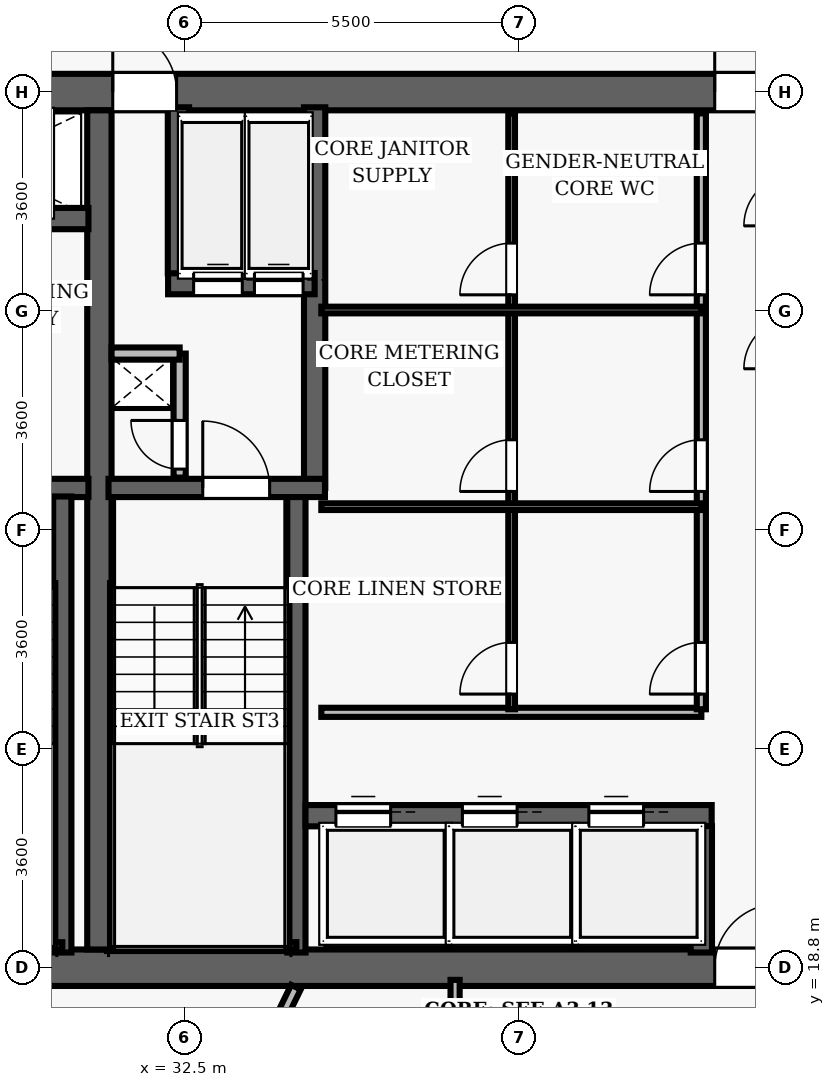
"""IFC4 building model, lengths in metres.
Left out: names, types, materials, properties, quantities, classifications, styles, units other than length and angle.
Written with IfcOpenShell. Run it as: python <this file> out.ifc"""

import sys

from ifc_helpers import new_model, si_unit, direction, frame, frame_2d, origin, place, context, subcontext, project, spatial, rectangle, extrude, element, fill, save


model = new_model("IFC4")
c1 = context("Model", 3, precision=1e-05, world=origin(), true_north=direction((0.0, 1.0)))
c2 = subcontext(c1, "Body", "Model", "MODEL_VIEW")
j1 = project(units=[si_unit("LENGTHUNIT", "METRE"), si_unit("PLANEANGLEUNIT", "RADIAN")], contexts=[c1])
p1 = place(None, origin())
s1 = spatial("IfcSite", under=j1, at=p1, CompositionType="ELEMENT")
p2 = place(p1, origin())
s2 = spatial("IfcBuilding", under=s1, at=p2, CompositionType="ELEMENT")
p3 = place(p2, frame((0.0, 0.0, 151.8)))
s3 = spatial("IfcBuildingStorey", under=s2, at=p3, CompositionType="ELEMENT", Elevation=151.8)
p4 = place(p3, frame((26.7, 18.8, 0.0), z_axis=(0.0, 0.0, 1.0), x_axis=(1.0, 0.0, 0.0)))
e1 = element("IfcWall", 1, at=p4, inside=s3, PredefinedType="SHEAR", context=c2, shape_type="SweptSolid", body=[
    extrude(rectangle(XDim=22.6, YDim=0.6, at=frame_2d((11.3, 0.0))), origin(), (0.0, 0.0, 1.0), 3.5),
])
p5 = place(p4, frame((14.52, 0.0, 0.0)))
e2 = element("IfcOpeningElement", 2, at=p5, cuts=e1, PredefinedType="OPENING", context=c2, shape_type="SweptSolid", body=[
    extrude(rectangle(XDim=1.05, YDim=2.15, at=frame_2d((0.525, 1.075))), frame((0.0, 0.31, 0.0), z_axis=(0.0, -1.0, 0.0), x_axis=(1.0, 0.0, 0.0)), (0.0, 0.0, 1.0), 0.62),
])
p6 = place(p3, frame((26.7, 33.2, 0.0), z_axis=(0.0, 0.0, 1.0), x_axis=(1.0, 0.0, 0.0)))
e3 = element("IfcWall", 3, at=p6, inside=s3, PredefinedType="SHEAR", context=c2, shape_type="SweptSolid", body=[
    extrude(rectangle(XDim=22.6, YDim=0.6, at=frame_2d((11.3, 0.0))), origin(), (0.0, 0.0, 1.0), 3.5),
])
p7 = place(p6, frame((4.62, 0.0, 0.0)))
e4 = element("IfcOpeningElement", 4, at=p7, cuts=e3, PredefinedType="OPENING", context=c2, shape_type="SweptSolid", body=[
    extrude(rectangle(XDim=1.05, YDim=2.15, at=frame_2d((0.525, 1.075))), frame((0.0, 0.31, 0.0), z_axis=(0.0, -1.0, 0.0), x_axis=(1.0, 0.0, 0.0)), (0.0, 0.0, 1.0), 0.62),
])
p8 = place(p6, frame((14.52, 0.0, 0.0)))
e5 = element("IfcOpeningElement", 5, at=p8, cuts=e3, PredefinedType="OPENING", context=c2, shape_type="SweptSolid", body=[
    extrude(rectangle(XDim=1.05, YDim=2.15, at=frame_2d((0.525, 1.075))), frame((0.0, 0.31, 0.0), z_axis=(0.0, -1.0, 0.0), x_axis=(1.0, 0.0, 0.0)), (0.0, 0.0, 1.0), 0.62),
])
p9 = place(p3, frame((31.1, 19.1, 0.0), z_axis=(0.0, 0.0, 1.0), x_axis=(0.0, 1.0, 0.0)))
e6 = element("IfcWall", 6, at=p9, inside=s3, PredefinedType="SHEAR", context=c2, shape_type="SweptSolid", body=[
    extrude(rectangle(XDim=13.8, YDim=0.4, at=frame_2d((6.9, 0.0))), origin(), (0.0, 0.0, 1.0), 3.5),
])
p10 = place(p3, frame((27.25, 26.69, 0.0), z_axis=(0.0, 0.0, 1.0), x_axis=(1.0, 0.0, 0.0)))
e7 = element("IfcWall", 7, at=p10, inside=s3, PredefinedType="SHEAR", context=c2, shape_type="SweptSolid", body=[
    extrude(rectangle(XDim=3.67, YDim=0.3, at=frame_2d((1.835, 0.0))), origin(), (0.0, 0.0, 1.0), 3.5),
])
p11 = place(p10, frame((1.05, 0.0, 0.0)))
e8 = element("IfcOpeningElement", 8, at=p11, cuts=e7, PredefinedType="OPENING", context=c2, shape_type="SweptSolid", body=[
    extrude(rectangle(XDim=1.1, YDim=2.15, at=frame_2d((0.55, 1.075))), frame((0.0, 0.16, 0.0), z_axis=(0.0, -1.0, 0.0), x_axis=(1.0, 0.0, 0.0)), (0.0, 0.0, 1.0), 0.32),
])
p12 = place(p3, frame((30.49, 19.05, 0.0), z_axis=(0.0, 0.0, 1.0), x_axis=(0.0, 1.0, 0.0)))
e9 = element("IfcWall", 9, at=p12, inside=s3, PredefinedType="SHEAR", context=c2, shape_type="SweptSolid", body=[
    extrude(rectangle(XDim=7.5, YDim=0.3, at=frame_2d((3.75, 0.0))), origin(), (0.0, 0.0, 1.0), 3.5),
])
p13 = place(p3, frame((27.395, 19.16, 0.0), z_axis=(0.0, 0.0, 1.0), x_axis=(1.0, 0.0, 0.0)))
e10 = element("IfcWall", 10, at=p13, inside=s3, PredefinedType="SHEAR", context=c2, shape_type="SweptSolid", body=[
    extrude(rectangle(XDim=3.095, YDim=0.12, at=frame_2d((1.547, 0.0))), origin(), (0.0, 0.0, 1.0), 3.5),
])
p14 = place(p3, frame((27.25, 31.12, 0.0), z_axis=(0.0, 0.0, 1.0), x_axis=(1.0, 0.0, 0.0)))
e11 = element("IfcWall", 11, at=p14, inside=s3, PredefinedType="SHEAR", context=c2, shape_type="SweptSolid", body=[
    extrude(rectangle(XDim=3.67, YDim=0.35, at=frame_2d((1.835, 0.0))), origin(), (0.0, 0.0, 1.0), 2.675),
])
p15 = place(p14, frame((1.25, 0.0, 0.0)))
e12 = element("IfcOpeningElement", 12, at=p15, cuts=e11, PredefinedType="OPENING", context=c2, shape_type="SweptSolid", body=[
    extrude(rectangle(XDim=1.1, YDim=2.15, at=frame_2d((0.55, 1.075))), frame((0.0, 0.185, 0.0), z_axis=(0.0, -1.0, 0.0), x_axis=(1.0, 0.0, 0.0)), (0.0, 0.0, 1.0), 0.37),
])
p16 = place(p3, frame((34.34, 19.05, 0.0), z_axis=(0.0, 0.0, 1.0), x_axis=(0.0, 1.0, 0.0)))
e13 = element("IfcWall", 13, at=p16, inside=s3, PredefinedType="SHEAR", context=c2, shape_type="SweptSolid", body=[
    extrude(rectangle(XDim=7.5, YDim=0.3, at=frame_2d((3.75, 0.0))), origin(), (0.0, 0.0, 1.0), 3.5),
])
p17 = place(p3, frame((34.64, 26.69, 0.0), z_axis=(0.0, 0.0, 1.0), x_axis=(0.0, 1.0, 0.0)))
e14 = element("IfcWall", 14, at=p17, inside=s3, PredefinedType="SHEAR", context=c2, shape_type="SweptSolid", body=[
    extrude(rectangle(XDim=6.26, YDim=0.35, at=frame_2d((3.13, 0.0))), origin(), (0.0, 0.0, 1.0), 3.5),
])
p18 = place(p3, frame((31.25, 26.69, 0.0), z_axis=(0.0, 0.0, 1.0), x_axis=(1.0, 0.0, 0.0)))
e15 = element("IfcWall", 15, at=p18, inside=s3, PredefinedType="SHEAR", context=c2, shape_type="SweptSolid", body=[
    extrude(rectangle(XDim=3.56, YDim=0.3, at=frame_2d((1.78, 0.0))), origin(), (0.0, 0.0, 1.0), 3.5),
])
p19 = place(p18, frame((1.55, 0.0, 0.0)))
e16 = element("IfcOpeningElement", 16, at=p19, cuts=e15, PredefinedType="OPENING", context=c2, shape_type="SweptSolid", body=[
    extrude(rectangle(XDim=1.1, YDim=2.15, at=frame_2d((0.55, 1.075))), frame((0.0, 0.16, 0.0), z_axis=(0.0, -1.0, 0.0), x_axis=(1.0, 0.0, 0.0)), (0.0, 0.0, 1.0), 0.32),
])
p20 = place(p3, frame((31.3, 19.16, 0.0), z_axis=(0.0, 0.0, 1.0), x_axis=(1.0, 0.0, 0.0)))
e17 = element("IfcWall", 17, at=p20, inside=s3, PredefinedType="SHEAR", context=c2, shape_type="SweptSolid", body=[
    extrude(rectangle(XDim=3.04, YDim=0.12, at=frame_2d((1.52, 0.0))), origin(), (0.0, 0.0, 1.0), 3.5),
])
p21 = place(p3, frame((32.23, 30.05, 0.0), z_axis=(0.0, 0.0, 1.0), x_axis=(1.0, 0.0, 0.0)))
e18 = element("IfcWall", 18, at=p21, inside=s3, PredefinedType="SHEAR", context=c2, shape_type="SweptSolid", body=[
    extrude(rectangle(XDim=2.41, YDim=0.35, at=frame_2d((1.205, 0.0))), origin(), (0.0, 0.0, 1.0), 2.675),
])
p22 = place(p21, frame((0.42, 0.0, 0.0)))
e19 = element("IfcOpeningElement", 19, at=p22, cuts=e18, PredefinedType="OPENING", context=c2, shape_type="SweptSolid", body=[
    extrude(rectangle(XDim=0.8, YDim=2.15, at=frame_2d((0.4, 1.075))), frame((0.0, 0.185, 0.0), z_axis=(0.0, -1.0, 0.0), x_axis=(1.0, 0.0, 0.0)), (0.0, 0.0, 1.0), 0.37),
])
p23 = place(p21, frame((1.42, 0.0, 0.0)))
e20 = element("IfcOpeningElement", 20, at=p23, cuts=e18, PredefinedType="OPENING", context=c2, shape_type="SweptSolid", body=[
    extrude(rectangle(XDim=0.8, YDim=2.15, at=frame_2d((0.4, 1.075))), frame((0.0, 0.185, 0.0), z_axis=(0.0, -1.0, 0.0), x_axis=(1.0, 0.0, 0.0)), (0.0, 0.0, 1.0), 0.37),
])
p24 = place(p3, frame((32.4, 30.22, 0.0), z_axis=(0.0, 0.0, 1.0), x_axis=(0.0, 1.0, 0.0)))
e21 = element("IfcWall", 21, at=p24, inside=s3, PredefinedType="SHEAR", context=c2, shape_type="SweptSolid", body=[
    extrude(rectangle(XDim=2.73, YDim=0.35, at=frame_2d((1.365, 0.0))), origin(), (0.0, 0.0, 1.0), 2.675),
])
p25 = place(p3, frame((32.42, 26.86, 0.0), z_axis=(0.0, 0.0, 1.0), x_axis=(0.0, 1.0, 0.0)))
e22 = element("IfcWall", 22, at=p25, inside=s3, PredefinedType="PARTITIONING", context=c2, shape_type="SweptSolid", body=[
    extrude(rectangle(XDim=2.04, YDim=0.2, at=frame_2d((1.02, 0.0))), origin(), (0.0, 0.0, 1.0), 2.675),
])
p26 = place(p25, frame((0.14, 0.0, 0.0)))
e23 = element("IfcOpeningElement", 23, at=p26, cuts=e22, PredefinedType="OPENING", context=c2, shape_type="SweptSolid", body=[
    extrude(rectangle(XDim=0.8, YDim=2.05, at=frame_2d((0.4, 1.025))), frame((0.0, 0.11, 0.0), z_axis=(0.0, -1.0, 0.0), x_axis=(1.0, 0.0, 0.0)), (0.0, 0.0, 1.0), 0.22),
])
p27 = place(p3, frame((31.3, 28.9, 0.0), z_axis=(0.0, 0.0, 1.0), x_axis=(1.0, 0.0, 0.0)))
e24 = element("IfcWall", 24, at=p27, inside=s3, PredefinedType="PARTITIONING", context=c2, shape_type="SweptSolid", body=[
    extrude(rectangle(XDim=1.12, YDim=0.2, at=frame_2d((0.56, 0.0))), origin(), (0.0, 0.0, 1.0), 2.675),
])
p28 = place(p3, frame((34.49, 21.3, 0.0), z_axis=(0.0, 0.0, 1.0), x_axis=(1.0, 0.0, 0.0)))
e25 = element("IfcWall", 25, at=p28, inside=s3, PredefinedType="SHEAR", context=c2, shape_type="SweptSolid", body=[
    extrude(rectangle(XDim=6.68, YDim=0.35, at=frame_2d((3.34, 0.0))), origin(), (0.0, 0.0, 1.0), 2.675),
])
p29 = place(p28, frame((0.5, 0.0, 0.0)))
e26 = element("IfcOpeningElement", 26, at=p29, cuts=e25, PredefinedType="OPENING", context=c2, shape_type="SweptSolid", body=[
    extrude(rectangle(XDim=0.9, YDim=2.15, at=frame_2d((0.45, 1.075))), frame((0.0, 0.185, 0.0), z_axis=(0.0, -1.0, 0.0), x_axis=(1.0, 0.0, 0.0)), (0.0, 0.0, 1.0), 0.37),
])
p30 = place(p28, frame((2.58, 0.0, 0.0)))
e27 = element("IfcOpeningElement", 27, at=p30, cuts=e25, PredefinedType="OPENING", context=c2, shape_type="SweptSolid", body=[
    extrude(rectangle(XDim=0.9, YDim=2.15, at=frame_2d((0.45, 1.075))), frame((0.0, 0.185, 0.0), z_axis=(0.0, -1.0, 0.0), x_axis=(1.0, 0.0, 0.0)), (0.0, 0.0, 1.0), 0.37),
])
p31 = place(p28, frame((4.66, 0.0, 0.0)))
e28 = element("IfcOpeningElement", 28, at=p31, cuts=e25, PredefinedType="OPENING", context=c2, shape_type="SweptSolid", body=[
    extrude(rectangle(XDim=0.9, YDim=2.15, at=frame_2d((0.45, 1.075))), frame((0.0, 0.185, 0.0), z_axis=(0.0, -1.0, 0.0), x_axis=(1.0, 0.0, 0.0)), (0.0, 0.0, 1.0), 0.37),
])
p32 = place(p3, frame((41.0, 19.05, 0.0), z_axis=(0.0, 0.0, 1.0), x_axis=(0.0, 1.0, 0.0)))
e29 = element("IfcWall", 29, at=p32, inside=s3, PredefinedType="SHEAR", context=c2, shape_type="SweptSolid", body=[
    extrude(rectangle(XDim=2.08, YDim=0.35, at=frame_2d((1.04, 0.0))), origin(), (0.0, 0.0, 1.0), 2.675),
])
p33 = place(p3, frame((34.75, 23.0, 0.0), z_axis=(0.0, 0.0, 1.0), x_axis=(1.0, 0.0, 0.0)))
e30 = element("IfcWall", 30, at=p33, inside=s3, PredefinedType="PARTITIONING", context=c2, shape_type="SweptSolid", body=[
    extrude(rectangle(XDim=6.25, YDim=0.15, at=frame_2d((3.125, 0.0))), origin(), (0.0, 0.0, 1.0), 2.675),
])
p34 = place(p3, frame((41.0, 23.05, 0.0), z_axis=(0.0, 0.0, 1.0), x_axis=(0.0, 1.0, 0.0)))
e31 = element("IfcWall", 31, at=p34, inside=s3, PredefinedType="PARTITIONING", context=c2, shape_type="SweptSolid", body=[
    extrude(rectangle(XDim=9.8, YDim=0.15, at=frame_2d((4.9, 0.0))), origin(), (0.0, 0.0, 1.0), 2.675),
])
p35 = place(p34, frame((0.25, 0.0, 0.0)))
e32 = element("IfcOpeningElement", 32, at=p35, cuts=e31, PredefinedType="OPENING", context=c2, shape_type="SweptSolid", body=[
    extrude(rectangle(XDim=0.85, YDim=2.1, at=frame_2d((0.425, 1.05))), frame((0.0, 0.085, 0.0), z_axis=(0.0, -1.0, 0.0), x_axis=(1.0, 0.0, 0.0)), (0.0, 0.0, 1.0), 0.17),
])
p36 = place(p34, frame((3.582, 0.0, 0.0)))
e33 = element("IfcOpeningElement", 33, at=p36, cuts=e31, PredefinedType="OPENING", context=c2, shape_type="SweptSolid", body=[
    extrude(rectangle(XDim=0.85, YDim=2.1, at=frame_2d((0.425, 1.05))), frame((0.0, 0.085, 0.0), z_axis=(0.0, -1.0, 0.0), x_axis=(1.0, 0.0, 0.0)), (0.0, 0.0, 1.0), 0.17),
])
p37 = place(p34, frame((6.816, 0.0, 0.0)))
e34 = element("IfcOpeningElement", 34, at=p37, cuts=e31, PredefinedType="OPENING", context=c2, shape_type="SweptSolid", body=[
    extrude(rectangle(XDim=0.85, YDim=2.1, at=frame_2d((0.425, 1.05))), frame((0.0, 0.085, 0.0), z_axis=(0.0, -1.0, 0.0), x_axis=(1.0, 0.0, 0.0)), (0.0, 0.0, 1.0), 0.17),
])
p38 = place(p3, frame((37.88, 23.05, 0.0), z_axis=(0.0, 0.0, 1.0), x_axis=(0.0, 1.0, 0.0)))
e35 = element("IfcWall", 35, at=p38, inside=s3, PredefinedType="PARTITIONING", context=c2, shape_type="SweptSolid", body=[
    extrude(rectangle(XDim=9.8, YDim=0.11, at=frame_2d((4.9, 0.0))), origin(), (0.0, 0.0, 1.0), 2.675),
])
p39 = place(p38, frame((0.25, 0.0, 0.0)))
e36 = element("IfcOpeningElement", 36, at=p39, cuts=e35, PredefinedType="OPENING", context=c2, shape_type="SweptSolid", body=[
    extrude(rectangle(XDim=0.85, YDim=2.1, at=frame_2d((0.425, 1.05))), frame((0.0, 0.065, 0.0), z_axis=(0.0, -1.0, 0.0), x_axis=(1.0, 0.0, 0.0)), (0.0, 0.0, 1.0), 0.13),
])
p40 = place(p38, frame((3.582, 0.0, 0.0)))
e37 = element("IfcOpeningElement", 37, at=p40, cuts=e35, PredefinedType="OPENING", context=c2, shape_type="SweptSolid", body=[
    extrude(rectangle(XDim=0.85, YDim=2.1, at=frame_2d((0.425, 1.05))), frame((0.0, 0.065, 0.0), z_axis=(0.0, -1.0, 0.0), x_axis=(1.0, 0.0, 0.0)), (0.0, 0.0, 1.0), 0.13),
])
p41 = place(p38, frame((6.816, 0.0, 0.0)))
e38 = element("IfcOpeningElement", 38, at=p41, cuts=e35, PredefinedType="OPENING", context=c2, shape_type="SweptSolid", body=[
    extrude(rectangle(XDim=0.85, YDim=2.1, at=frame_2d((0.425, 1.05))), frame((0.0, 0.065, 0.0), z_axis=(0.0, -1.0, 0.0), x_axis=(1.0, 0.0, 0.0)), (0.0, 0.0, 1.0), 0.13),
])
for number, where, z_axis, x_axis in (
    (39, (34.75, 26.382, 0.0), (0.0, 0.0, 1.0), (1.0, 0.0, 0.0)),
    (40, (34.75, 29.616, 0.0), (0.0, 0.0, 1.0), (1.0, 0.0, 0.0)),
):
    element("IfcWall", number, at=place(p3, frame(where, z_axis=z_axis, x_axis=x_axis)), inside=s3, PredefinedType="PARTITIONING", context=c2, shape_type="SweptSolid", body=[
        extrude(rectangle(XDim=6.25, YDim=0.11, at=frame_2d((3.125, 0.0))), origin(), (0.0, 0.0, 1.0), 2.675),
    ])
p42 = place(p3, frame((36.95, 11.2, 0.0), z_axis=(0.0, 0.0, 1.0), x_axis=(0.0, 1.0, 0.0)))
e41 = element("IfcWall", 41, at=p42, inside=s3, PredefinedType="PARTITIONING", context=c2, shape_type="SweptSolid", body=[
    extrude(rectangle(XDim=7.4, YDim=0.15, at=frame_2d((3.7, 0.0))), origin(), (0.0, 0.0, 1.0), 2.675),
])
p43 = place(p42, frame((5.075, 0.0, 0.0)))
e42 = element("IfcOpeningElement", 42, at=p43, cuts=e41, PredefinedType="OPENING", context=c2, shape_type="SweptSolid", body=[
    extrude(rectangle(XDim=0.95, YDim=2.15, at=frame_2d((0.475, 1.075))), frame((0.0, 0.085, 0.0), z_axis=(0.0, -1.0, 0.0), x_axis=(1.0, 0.0, 0.0)), (0.0, 0.0, 1.0), 0.17),
])
p44 = place(p3, frame((34.332, 18.48, 0.0), z_axis=(0.0, 0.0, 1.0), x_axis=(-0.43836706514, -0.898796037041, 0.0)))
e43 = element("IfcWall", 43, at=p44, inside=s3, PredefinedType="PARTITIONING", context=c2, shape_type="SweptSolid", body=[
    extrude(rectangle(XDim=14.541, YDim=0.175, at=frame_2d((7.271, 0.0))), origin(), (0.0, 0.0, 1.0), 2.675),
])
p45 = place(p19, origin())
e44 = element("IfcDoor", 44, at=p45, inside=s3, OperationType="SINGLE_SWING_LEFT", PredefinedType="DOOR", context=c2, shape_type="SweptSolid", body=[
    extrude(rectangle(XDim=1.1, YDim=2.15, at=frame_2d((0.55, 1.075))), frame((0.0, 0.025, 0.0), z_axis=(0.0, -1.0, 0.0), x_axis=(1.0, 0.0, 0.0)), (0.0, 0.0, 1.0), 0.05),
])
fill(e16, e44)
p46 = place(p26, origin())
e45 = element("IfcDoor", 45, at=p46, inside=s3, OperationType="SINGLE_SWING_RIGHT", PredefinedType="DOOR", context=c2, shape_type="SweptSolid", body=[
    extrude(rectangle(XDim=0.8, YDim=2.05, at=frame_2d((0.4, 1.025))), frame((0.0, 0.025, 0.0), z_axis=(0.0, -1.0, 0.0), x_axis=(1.0, 0.0, 0.0)), (0.0, 0.0, 1.0), 0.05),
])
fill(e23, e45)
p47 = place(p7, origin())
e46 = element("IfcDoor", 46, at=p47, inside=s3, OperationType="SINGLE_SWING_LEFT", PredefinedType="DOOR", context=c2, shape_type="SweptSolid", body=[
    extrude(rectangle(XDim=1.05, YDim=2.15, at=frame_2d((0.525, 1.075))), frame((0.0, 0.025, 0.0), z_axis=(0.0, -1.0, 0.0), x_axis=(1.0, 0.0, 0.0)), (0.0, 0.0, 1.0), 0.05),
])
fill(e4, e46)
p48 = place(p8, origin())
e47 = element("IfcDoor", 47, at=p48, inside=s3, OperationType="SINGLE_SWING_LEFT", PredefinedType="DOOR", context=c2, shape_type="SweptSolid", body=[
    extrude(rectangle(XDim=1.05, YDim=2.15, at=frame_2d((0.525, 1.075))), frame((0.0, 0.025, 0.0), z_axis=(0.0, -1.0, 0.0), x_axis=(1.0, 0.0, 0.0)), (0.0, 0.0, 1.0), 0.05),
])
fill(e5, e47)
p49 = place(p5, origin())
e48 = element("IfcDoor", 48, at=p49, inside=s3, OperationType="SINGLE_SWING_RIGHT", PredefinedType="DOOR", context=c2, shape_type="SweptSolid", body=[
    extrude(rectangle(XDim=1.05, YDim=2.15, at=frame_2d((0.525, 1.075))), frame((0.0, 0.025, 0.0), z_axis=(0.0, -1.0, 0.0), x_axis=(1.0, 0.0, 0.0)), (0.0, 0.0, 1.0), 0.05),
])
fill(e2, e48)
p50 = place(p35, origin())
e49 = element("IfcDoor", 49, at=p50, inside=s3, OperationType="SINGLE_SWING_LEFT", PredefinedType="DOOR", context=c2, shape_type="SweptSolid", body=[
    extrude(rectangle(XDim=0.85, YDim=2.1, at=frame_2d((0.425, 1.05))), frame((0.0, 0.025, 0.0), z_axis=(0.0, -1.0, 0.0), x_axis=(1.0, 0.0, 0.0)), (0.0, 0.0, 1.0), 0.05),
])
fill(e32, e49)
p51 = place(p39, origin())
e50 = element("IfcDoor", 50, at=p51, inside=s3, OperationType="SINGLE_SWING_LEFT", PredefinedType="DOOR", context=c2, shape_type="SweptSolid", body=[
    extrude(rectangle(XDim=0.85, YDim=2.1, at=frame_2d((0.425, 1.05))), frame((0.0, 0.025, 0.0), z_axis=(0.0, -1.0, 0.0), x_axis=(1.0, 0.0, 0.0)), (0.0, 0.0, 1.0), 0.05),
])
fill(e36, e50)
p52 = place(p36, origin())
e51 = element("IfcDoor", 51, at=p52, inside=s3, OperationType="SINGLE_SWING_LEFT", PredefinedType="DOOR", context=c2, shape_type="SweptSolid", body=[
    extrude(rectangle(XDim=0.85, YDim=2.1, at=frame_2d((0.425, 1.05))), frame((0.0, 0.025, 0.0), z_axis=(0.0, -1.0, 0.0), x_axis=(1.0, 0.0, 0.0)), (0.0, 0.0, 1.0), 0.05),
])
fill(e33, e51)
p53 = place(p40, origin())
e52 = element("IfcDoor", 52, at=p53, inside=s3, OperationType="SINGLE_SWING_LEFT", PredefinedType="DOOR", context=c2, shape_type="SweptSolid", body=[
    extrude(rectangle(XDim=0.85, YDim=2.1, at=frame_2d((0.425, 1.05))), frame((0.0, 0.025, 0.0), z_axis=(0.0, -1.0, 0.0), x_axis=(1.0, 0.0, 0.0)), (0.0, 0.0, 1.0), 0.05),
])
fill(e37, e52)
p54 = place(p37, origin())
e53 = element("IfcDoor", 53, at=p54, inside=s3, OperationType="SINGLE_SWING_LEFT", PredefinedType="DOOR", context=c2, shape_type="SweptSolid", body=[
    extrude(rectangle(XDim=0.85, YDim=2.1, at=frame_2d((0.425, 1.05))), frame((0.0, 0.025, 0.0), z_axis=(0.0, -1.0, 0.0), x_axis=(1.0, 0.0, 0.0)), (0.0, 0.0, 1.0), 0.05),
])
fill(e34, e53)
p55 = place(p41, origin())
e54 = element("IfcDoor", 54, at=p55, inside=s3, OperationType="SINGLE_SWING_LEFT", PredefinedType="DOOR", context=c2, shape_type="SweptSolid", body=[
    extrude(rectangle(XDim=0.85, YDim=2.1, at=frame_2d((0.425, 1.05))), frame((0.0, 0.025, 0.0), z_axis=(0.0, -1.0, 0.0), x_axis=(1.0, 0.0, 0.0)), (0.0, 0.0, 1.0), 0.05),
])
fill(e38, e54)
p56 = place(p29, origin())
e55 = element("IfcDoor", 55, at=p56, inside=s3, OperationType="SLIDING_TO_LEFT", PredefinedType="DOOR", context=c2, shape_type="SweptSolid", body=[
    extrude(rectangle(XDim=0.9, YDim=2.15, at=frame_2d((0.45, 1.075))), frame((0.0, 0.025, 0.0), z_axis=(0.0, -1.0, 0.0), x_axis=(1.0, 0.0, 0.0)), (0.0, 0.0, 1.0), 0.05),
])
fill(e26, e55)
p57 = place(p30, origin())
e56 = element("IfcDoor", 56, at=p57, inside=s3, OperationType="SLIDING_TO_LEFT", PredefinedType="DOOR", context=c2, shape_type="SweptSolid", body=[
    extrude(rectangle(XDim=0.9, YDim=2.15, at=frame_2d((0.45, 1.075))), frame((0.0, 0.025, 0.0), z_axis=(0.0, -1.0, 0.0), x_axis=(1.0, 0.0, 0.0)), (0.0, 0.0, 1.0), 0.05),
])
fill(e27, e56)
p58 = place(p31, origin())
e57 = element("IfcDoor", 57, at=p58, inside=s3, OperationType="SLIDING_TO_LEFT", PredefinedType="DOOR", context=c2, shape_type="SweptSolid", body=[
    extrude(rectangle(XDim=0.9, YDim=2.15, at=frame_2d((0.45, 1.075))), frame((0.0, 0.025, 0.0), z_axis=(0.0, -1.0, 0.0), x_axis=(1.0, 0.0, 0.0)), (0.0, 0.0, 1.0), 0.05),
])
fill(e28, e57)
p59 = place(p22, origin())
e58 = element("IfcDoor", 58, at=p59, inside=s3, OperationType="SLIDING_TO_LEFT", PredefinedType="DOOR", context=c2, shape_type="SweptSolid", body=[
    extrude(rectangle(XDim=0.8, YDim=2.15, at=frame_2d((0.4, 1.075))), frame((0.0, 0.025, 0.0), z_axis=(0.0, -1.0, 0.0), x_axis=(1.0, 0.0, 0.0)), (0.0, 0.0, 1.0), 0.05),
])
fill(e19, e58)
p60 = place(p23, origin())
e59 = element("IfcDoor", 59, at=p60, inside=s3, OperationType="SLIDING_TO_LEFT", PredefinedType="DOOR", context=c2, shape_type="SweptSolid", body=[
    extrude(rectangle(XDim=0.8, YDim=2.15, at=frame_2d((0.4, 1.075))), frame((0.0, 0.025, 0.0), z_axis=(0.0, -1.0, 0.0), x_axis=(1.0, 0.0, 0.0)), (0.0, 0.0, 1.0), 0.05),
])
fill(e20, e59)
save(model, sys.argv[1])
